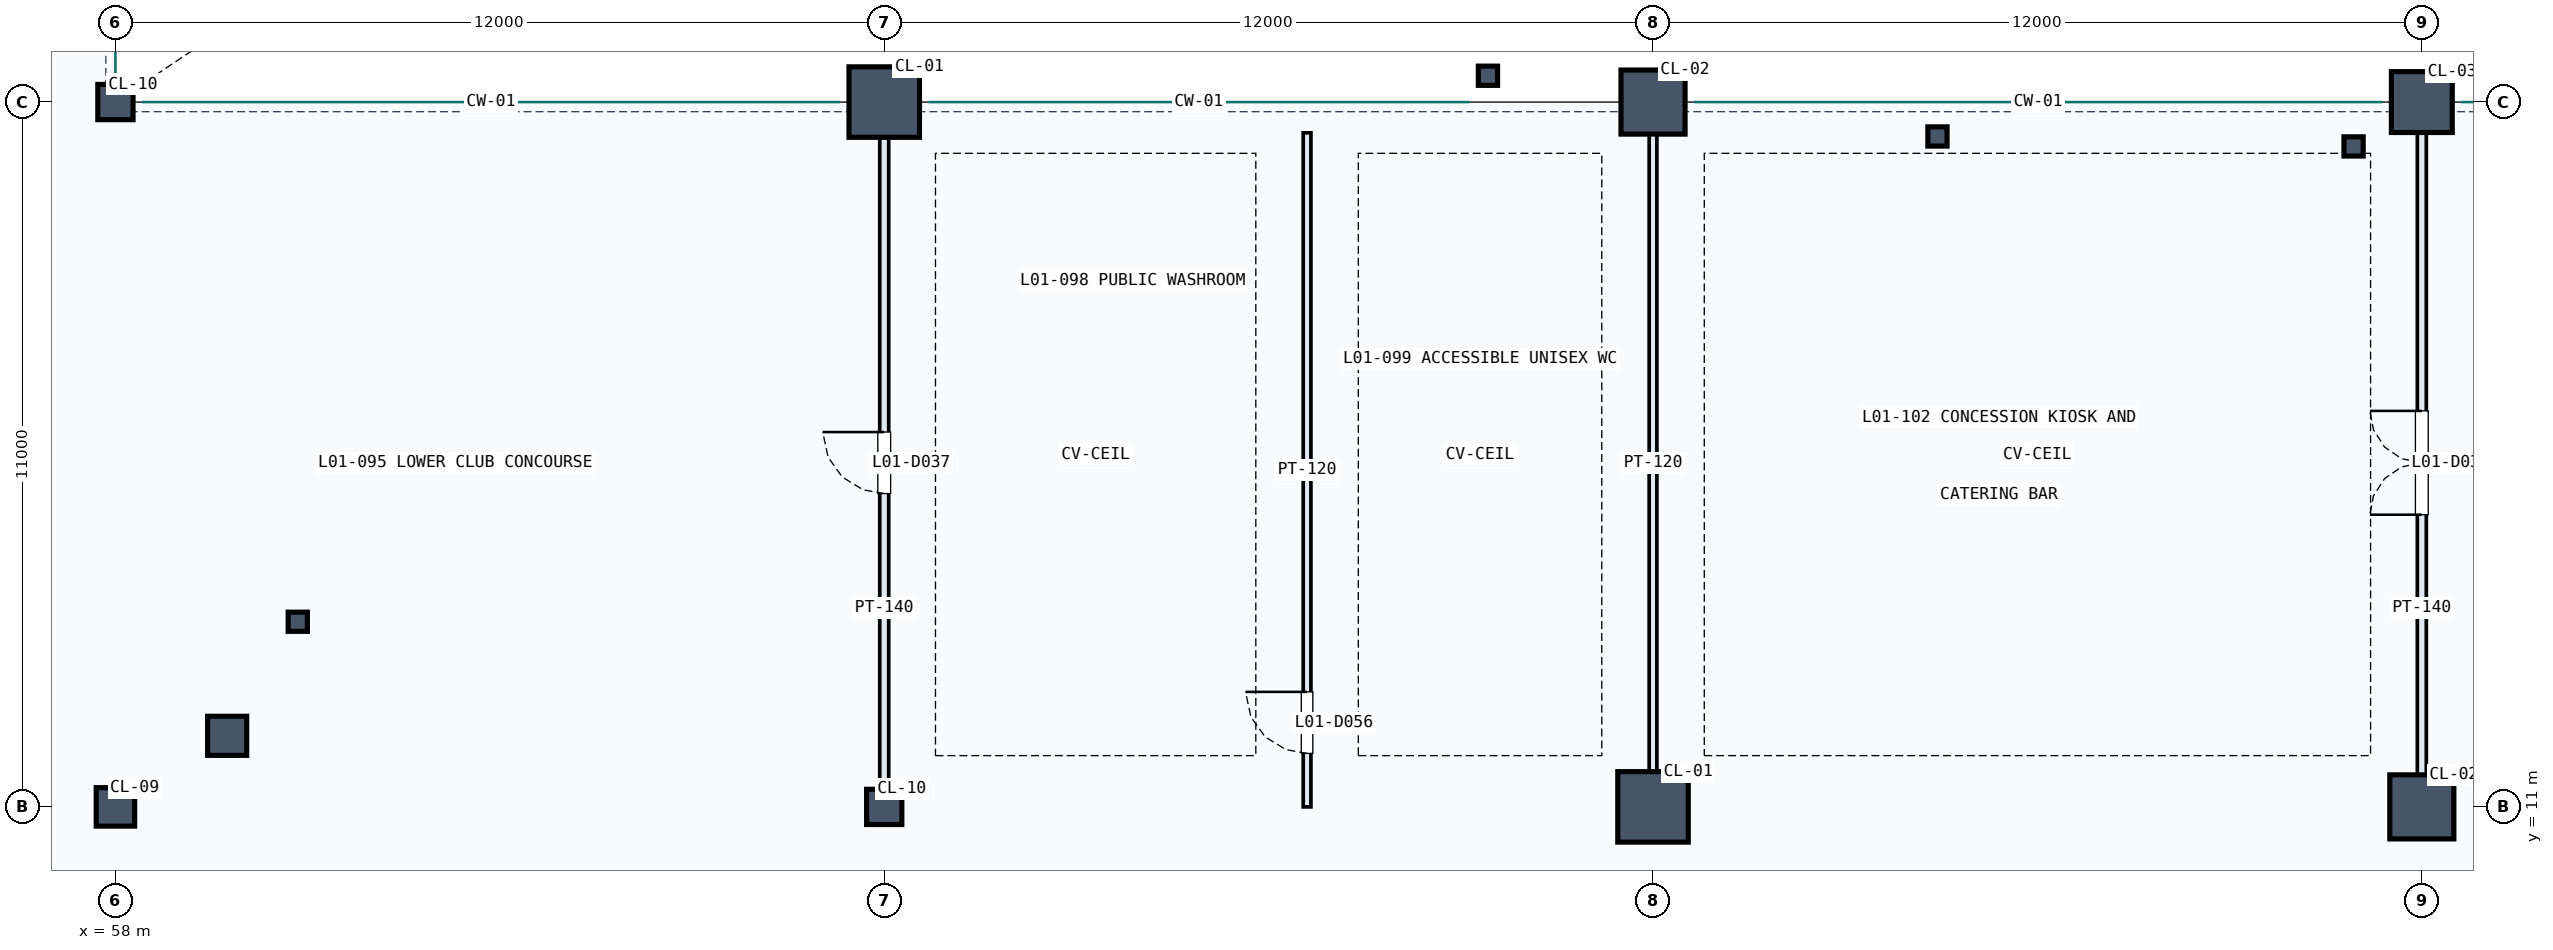
"""IFC4 building model, lengths in metres.
Left out: names, types, materials, properties, quantities, classifications, styles, units other than length and angle.
Written with IfcOpenShell. Run it as: python <this file> out.ifc"""

import sys

from ifc_helpers import new_model, si_unit, direction, frame, frame_2d, origin, origin_2d, place, context, subcontext, project, spatial, rectangle, hollow_rectangle, hollow_circle, extrude, element, fill, save


model = new_model("IFC4")
c1 = context("Model", 3, precision=1e-05, world=origin(), true_north=direction((0.0, 1.0)))
c2 = subcontext(c1, "Body", "Model", "MODEL_VIEW")
j1 = project(units=[si_unit("LENGTHUNIT", "METRE"), si_unit("PLANEANGLEUNIT", "RADIAN")], contexts=[c1])
p1 = place(None, origin())
s1 = spatial("IfcSite", under=j1, at=p1, CompositionType="ELEMENT")
p2 = place(p1, origin())
s2 = spatial("IfcBuilding", under=s1, at=p2, CompositionType="ELEMENT")
p3 = place(p2, frame((0.0, 0.0, 5.4)))
s3 = spatial("IfcBuildingStorey", under=s2, at=p3, CompositionType="ELEMENT", Elevation=5.4)
p4 = place(p3, frame((58.0, 11.0, 0.0), z_axis=(0.0, 0.0, 1.0), x_axis=(1.0, 0.0, 0.0)))
e1 = element("IfcColumn", 1, at=p4, inside=s3, PredefinedType="COLUMN", context=c2, shape_type="SweptSolid", body=[
    extrude(rectangle(XDim=0.6, YDim=0.6, at=origin_2d()), origin(), (0.0, 0.0, 1.0), 4.8),
])
for number, where, z_axis, x_axis in (
    (2, (58.0, 22.0, 0.0), (0.0, 0.0, 1.0), (1.0, 0.0, 0.0)),
    (3, (70.0, 11.0, 0.0), (0.0, 0.0, 1.0), (1.0, 0.0, 0.0)),
):
    element("IfcColumn", number, at=place(p3, frame(where, z_axis=z_axis, x_axis=x_axis)), inside=s3, PredefinedType="COLUMN", context=c2, shape_type="SweptSolid", body=[
        extrude(rectangle(XDim=0.55, YDim=0.55, at=origin_2d()), origin(), (0.0, 0.0, 1.0), 4.8),
    ])
for number, where, z_axis, x_axis in (
    (4, (70.0, 22.0, 0.0), (0.0, 0.0, 1.0), (1.0, 0.0, 0.0)),
    (5, (82.0, 11.0, 0.0), (0.0, 0.0, 1.0), (1.0, 0.0, 0.0)),
):
    element("IfcColumn", number, at=place(p3, frame(where, z_axis=z_axis, x_axis=x_axis)), inside=s3, PredefinedType="COLUMN", context=c2, shape_type="SweptSolid", body=[
        extrude(rectangle(XDim=1.1, YDim=1.1, at=origin_2d()), origin(), (0.0, 0.0, 1.0), 4.8),
    ])
for number, where, z_axis, x_axis in (
    (6, (82.0, 22.0, 0.0), (0.0, 0.0, 1.0), (1.0, 0.0, 0.0)),
    (7, (94.0, 11.0, 0.0), (0.0, 0.0, 1.0), (1.0, 0.0, 0.0)),
):
    element("IfcColumn", number, at=place(p3, frame(where, z_axis=z_axis, x_axis=x_axis)), inside=s3, PredefinedType="COLUMN", context=c2, shape_type="SweptSolid", body=[
        extrude(rectangle(XDim=1.0, YDim=1.0, at=origin_2d()), origin(), (0.0, 0.0, 1.0), 4.8),
    ])
p5 = place(p3, frame((94.0, 22.0, 0.0), z_axis=(0.0, 0.0, 1.0), x_axis=(1.0, 0.0, 0.0)))
e8 = element("IfcColumn", 8, at=p5, inside=s3, PredefinedType="COLUMN", context=c2, shape_type="SweptSolid", body=[
    extrude(rectangle(XDim=0.95, YDim=0.95, at=origin_2d()), origin(), (0.0, 0.0, 1.0), 4.8),
])
p6 = place(p3, frame((59.744, 12.109, 0.0), z_axis=(0.0, 0.0, 1.0), x_axis=(1.0, 0.0, 0.0)))
e9 = element("IfcColumn", 9, at=p6, inside=s3, PredefinedType="COLUMN", context=c2, shape_type="SweptSolid", body=[
    extrude(hollow_circle(Radius=0.305, WallThickness=0.025, at=origin_2d()), origin(), (0.0, 0.0, 1.0), 4.8),
])
for number, where, z_axis, x_axis in (
    (10, (79.423, 22.411, 0.0), (0.0, 0.0, 1.0), (1.0, 0.0, 0.0)),
    (11, (86.44, 21.463, 0.0), (0.0, 0.0, 1.0), (1.0, 0.0, 0.0)),
    (12, (92.935, 21.308, 0.0), (0.0, 0.0, 1.0), (1.0, 0.0, 0.0)),
    (13, (60.846, 13.89, 0.0), (0.0, 0.0, 1.0), (1.0, 0.0, 0.0)),
):
    element("IfcColumn", number, at=place(p3, frame(where, z_axis=z_axis, x_axis=x_axis)), inside=s3, PredefinedType="COLUMN", context=c2, shape_type="SweptSolid", body=[
        extrude(hollow_rectangle(XDim=0.3, YDim=0.3, WallThickness=0.016, at=origin_2d()), origin(), (0.0, 0.0, 1.0), 4.8),
    ])
p7 = place(p3, frame((70.0, 11.22, 0.0), z_axis=(0.0, 0.0, 1.0), x_axis=(0.0, 1.0, 0.0)))
e14 = element("IfcWall", 14, at=p7, inside=s3, PredefinedType="PARTITIONING", context=c2, shape_type="SweptSolid", body=[
    extrude(rectangle(XDim=10.3, YDim=0.14, at=frame_2d((5.15, 0.0))), origin(), (0.0, 0.0, 1.0), 3.79),
])
p8 = place(p7, frame((4.67, 0.0, 0.0)))
e15 = element("IfcOpeningElement", 15, at=p8, cuts=e14, PredefinedType="OPENING", context=c2, shape_type="SweptSolid", body=[
    extrude(rectangle(XDim=0.96, YDim=2.15, at=frame_2d((0.48, 1.075))), frame((0.0, 0.08, 0.0), z_axis=(0.0, -1.0, 0.0), x_axis=(1.0, 0.0, 0.0)), (0.0, 0.0, 1.0), 0.16),
])
p9 = place(p3, frame((94.0, 11.22, 0.0), z_axis=(0.0, 0.0, 1.0), x_axis=(0.0, 1.0, 0.0)))
e16 = element("IfcWall", 16, at=p9, inside=s3, PredefinedType="PARTITIONING", context=c2, shape_type="SweptSolid", body=[
    extrude(rectangle(XDim=10.3, YDim=0.14, at=frame_2d((5.15, 0.0))), origin(), (0.0, 0.0, 1.0), 3.64),
])
p10 = place(p9, frame((4.34, 0.0, 0.0)))
e17 = element("IfcOpeningElement", 17, at=p10, cuts=e16, PredefinedType="OPENING", context=c2, shape_type="SweptSolid", body=[
    extrude(rectangle(XDim=1.62, YDim=2.25, at=frame_2d((0.81, 1.125))), frame((0.0, 0.08, 0.0), z_axis=(0.0, -1.0, 0.0), x_axis=(1.0, 0.0, 0.0)), (0.0, 0.0, 1.0), 0.16),
])
p11 = place(p3, frame((76.6, 11.0, 0.0), z_axis=(0.0, 0.0, 1.0), x_axis=(0.0, 1.0, 0.0)))
e18 = element("IfcWall", 18, at=p11, inside=s3, PredefinedType="PARTITIONING", context=c2, shape_type="SweptSolid", body=[
    extrude(rectangle(XDim=10.52, YDim=0.12, at=frame_2d((5.26, 0.0))), origin(), (0.0, 0.0, 1.0), 3.89),
])
p12 = place(p11, frame((0.835, 0.0, 0.0)))
e19 = element("IfcOpeningElement", 19, at=p12, cuts=e18, PredefinedType="OPENING", context=c2, shape_type="SweptSolid", body=[
    extrude(rectangle(XDim=0.96, YDim=2.15, at=frame_2d((0.48, 1.075))), frame((0.0, 0.07, 0.0), z_axis=(0.0, -1.0, 0.0), x_axis=(1.0, 0.0, 0.0)), (0.0, 0.0, 1.0), 0.14),
])
p13 = place(p3, frame((82.0, 11.22, 0.0), z_axis=(0.0, 0.0, 1.0), x_axis=(0.0, 1.0, 0.0)))
e20 = element("IfcWall", 20, at=p13, inside=s3, PredefinedType="PARTITIONING", context=c2, shape_type="SweptSolid", body=[
    extrude(rectangle(XDim=10.3, YDim=0.12, at=frame_2d((5.15, 0.0))), origin(), (0.0, 0.0, 1.0), 3.49),
])
p14 = place(p8, origin())
e21 = element("IfcDoor", 21, at=p14, inside=s3, OperationType="SINGLE_SWING_RIGHT", PredefinedType="DOOR", context=c2, shape_type="SweptSolid", body=[
    extrude(rectangle(XDim=0.96, YDim=2.15, at=frame_2d((0.48, 1.075))), frame((0.0, 0.025, 0.0), z_axis=(0.0, -1.0, 0.0), x_axis=(1.0, 0.0, 0.0)), (0.0, 0.0, 1.0), 0.05),
])
fill(e15, e21)
p15 = place(p10, origin())
e22 = element("IfcDoor", 22, at=p15, inside=s3, OperationType="DOUBLE_DOOR_SINGLE_SWING", PredefinedType="DOOR", context=c2, shape_type="SweptSolid", body=[
    extrude(rectangle(XDim=1.62, YDim=2.25, at=frame_2d((0.81, 1.125))), frame((0.0, 0.025, 0.0), z_axis=(0.0, -1.0, 0.0), x_axis=(1.0, 0.0, 0.0)), (0.0, 0.0, 1.0), 0.05),
])
fill(e17, e22)
p16 = place(p12, origin())
e23 = element("IfcDoor", 23, at=p16, inside=s3, OperationType="SINGLE_SWING_RIGHT", PredefinedType="DOOR", context=c2, shape_type="SweptSolid", body=[
    extrude(rectangle(XDim=0.96, YDim=2.15, at=frame_2d((0.48, 1.075))), frame((0.0, 0.025, 0.0), z_axis=(0.0, -1.0, 0.0), x_axis=(1.0, 0.0, 0.0)), (0.0, 0.0, 1.0), 0.05),
])
fill(e19, e23)
save(model, sys.argv[1])
